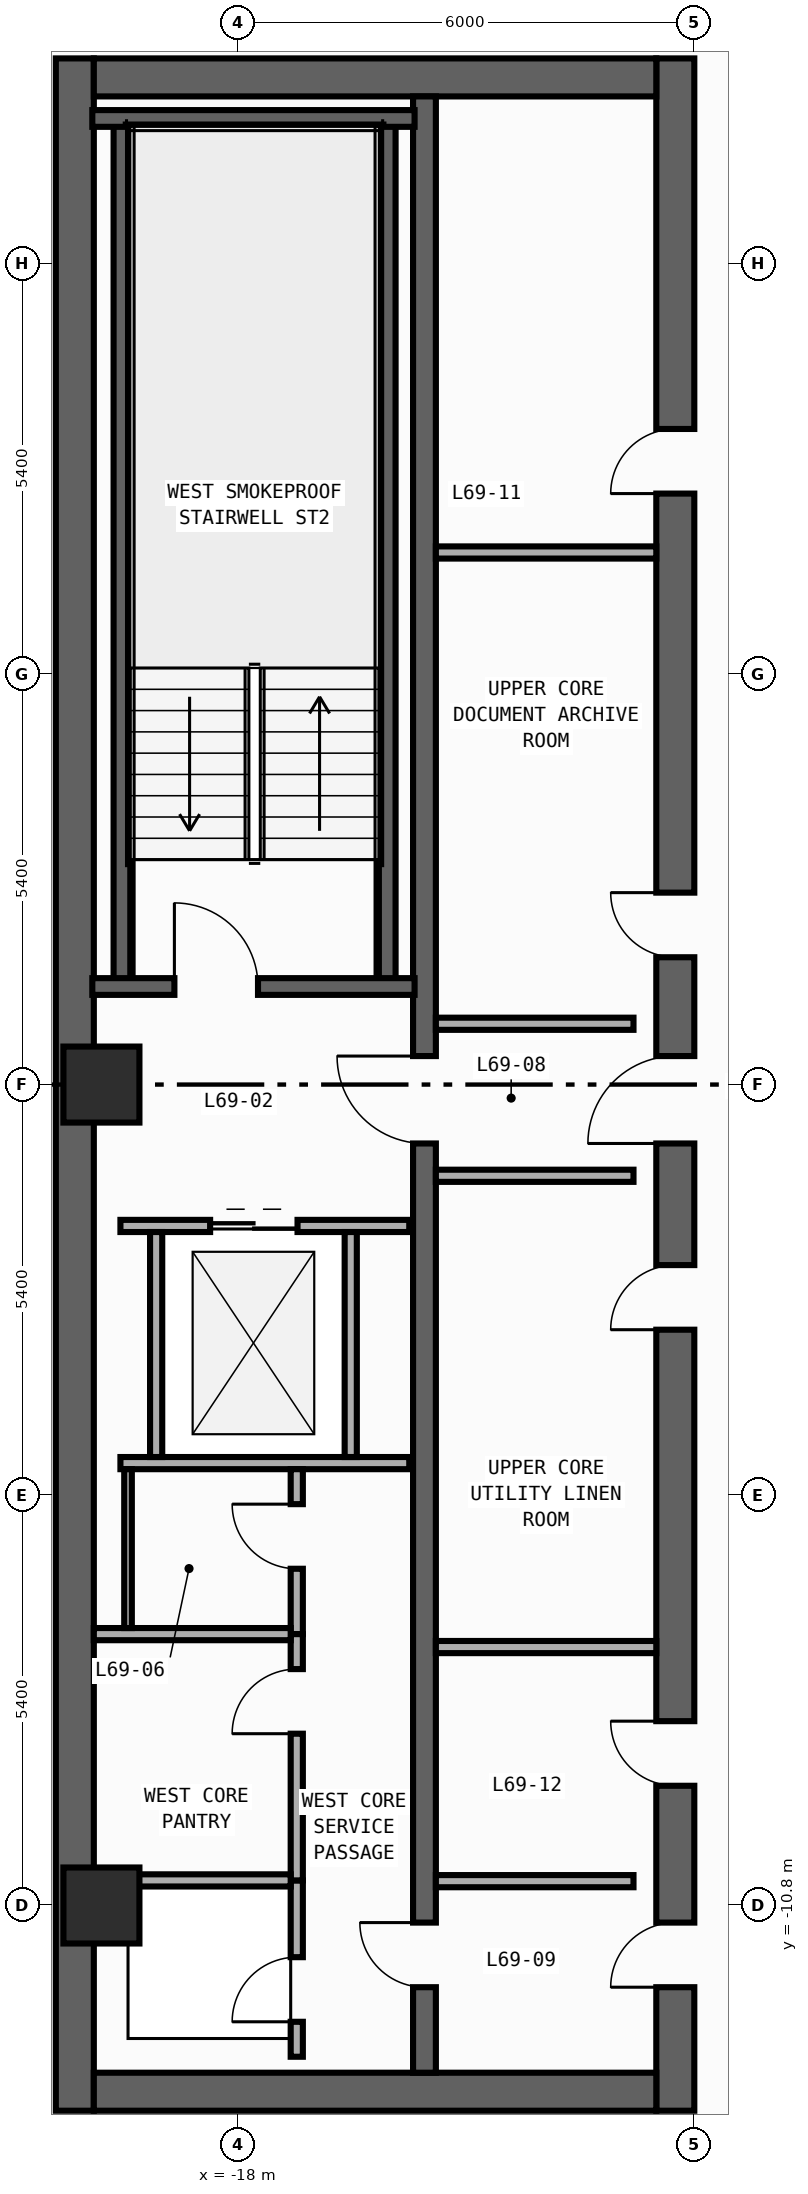
"""IFC4 building model, lengths in metres.
Left out: names, types, materials, properties, quantities, classifications, styles, units other than length and angle.
Written with IfcOpenShell. Run it as: python <this file> out.ifc"""

import sys

from ifc_helpers import new_model, si_unit, direction, frame, frame_2d, origin, origin_2d, place, context, subcontext, project, spatial, rectangle, circle, extrude, element, fill, save


model = new_model("IFC4")
c1 = context("Model", 3, precision=1e-05, world=origin(), true_north=direction((0.0, 1.0)))
c2 = subcontext(c1, "Body", "Model", "MODEL_VIEW")
j1 = project(units=[si_unit("LENGTHUNIT", "METRE"), si_unit("PLANEANGLEUNIT", "RADIAN")], contexts=[c1])
p1 = place(None, origin())
s1 = spatial("IfcSite", under=j1, at=p1, CompositionType="ELEMENT")
p2 = place(p1, origin())
s2 = spatial("IfcBuilding", under=s1, at=p2, CompositionType="ELEMENT")
p3 = place(p2, frame((0.0, 0.0, 289.0)))
s3 = spatial("IfcBuildingStorey", under=s2, at=p3, CompositionType="ELEMENT", Elevation=289.0)
p4 = place(p3, frame((-20.15, -13.5, 0.0), z_axis=(0.0, 0.0, 1.0), x_axis=(0.0, 1.0, 0.0)))
e1 = element("IfcWall", 1, at=p4, inside=s3, PredefinedType="SHEAR", context=c2, shape_type="SweptSolid", body=[
    extrude(rectangle(XDim=27.0, YDim=0.5, at=frame_2d((13.5, 0.0))), origin(), (0.0, 0.0, 1.0), 3.54),
])
p5 = place(p3, frame((-12.25, -13.5, 0.0), z_axis=(0.0, 0.0, 1.0), x_axis=(0.0, 1.0, 0.0)))
e2 = element("IfcWall", 2, at=p5, inside=s3, PredefinedType="SHEAR", context=c2, shape_type="SweptSolid", body=[
    extrude(rectangle(XDim=27.0, YDim=0.5, at=frame_2d((13.5, 0.0))), origin(), (0.0, 0.0, 1.0), 3.54),
])
p6 = place(p5, frame((15.175, 0.0, 0.0)))
e3 = element("IfcOpeningElement", 3, at=p6, cuts=e2, PredefinedType="OPENING", context=c2, shape_type="SweptSolid", body=[
    extrude(rectangle(XDim=0.85, YDim=2.1, at=frame_2d((0.425, 1.05))), frame((0.0, 0.26, 0.0), z_axis=(0.0, -1.0, 0.0), x_axis=(1.0, 0.0, 0.0)), (0.0, 0.0, 1.0), 0.52),
])
p7 = place(p5, frame((21.275, 0.0, 0.0)))
e4 = element("IfcOpeningElement", 4, at=p7, cuts=e2, PredefinedType="OPENING", context=c2, shape_type="SweptSolid", body=[
    extrude(rectangle(XDim=0.85, YDim=2.1, at=frame_2d((0.425, 1.05))), frame((0.0, 0.26, 0.0), z_axis=(0.0, -1.0, 0.0), x_axis=(1.0, 0.0, 0.0)), (0.0, 0.0, 1.0), 0.52),
])
p8 = place(p5, frame((4.275, 0.0, 0.0)))
e5 = element("IfcOpeningElement", 5, at=p8, cuts=e2, PredefinedType="OPENING", context=c2, shape_type="SweptSolid", body=[
    extrude(rectangle(XDim=0.85, YDim=2.1, at=frame_2d((0.425, 1.05))), frame((0.0, 0.26, 0.0), z_axis=(0.0, -1.0, 0.0), x_axis=(1.0, 0.0, 0.0)), (0.0, 0.0, 1.0), 0.52),
])
p9 = place(p5, frame((10.275, 0.0, 0.0)))
e6 = element("IfcOpeningElement", 6, at=p9, cuts=e2, PredefinedType="OPENING", context=c2, shape_type="SweptSolid", body=[
    extrude(rectangle(XDim=0.85, YDim=2.1, at=frame_2d((0.425, 1.05))), frame((0.0, 0.26, 0.0), z_axis=(0.0, -1.0, 0.0), x_axis=(1.0, 0.0, 0.0)), (0.0, 0.0, 1.0), 0.52),
])
p10 = place(p5, frame((12.725, 0.0, 0.0)))
e7 = element("IfcOpeningElement", 7, at=p10, cuts=e2, PredefinedType="OPENING", context=c2, shape_type="SweptSolid", body=[
    extrude(rectangle(XDim=1.15, YDim=2.2, at=frame_2d((0.575, 1.1))), frame((0.0, 0.26, 0.0), z_axis=(0.0, -1.0, 0.0), x_axis=(1.0, 0.0, 0.0)), (0.0, 0.0, 1.0), 0.52),
])
p11 = place(p5, frame((1.625, 0.0, 0.0)))
e8 = element("IfcOpeningElement", 8, at=p11, cuts=e2, PredefinedType="OPENING", context=c2, shape_type="SweptSolid", body=[
    extrude(rectangle(XDim=0.85, YDim=2.1, at=frame_2d((0.425, 1.05))), frame((0.0, 0.26, 0.0), z_axis=(0.0, -1.0, 0.0), x_axis=(1.0, 0.0, 0.0)), (0.0, 0.0, 1.0), 0.52),
])
for number, where, z_axis, x_axis in (
    (9, (-19.9, -13.25, 0.0), (0.0, 0.0, 1.0), (1.0, 0.0, 0.0)),
    (10, (-19.9, 13.25, 0.0), (0.0, 0.0, 1.0), (1.0, 0.0, 0.0)),
):
    element("IfcWall", number, at=place(p3, frame(where, z_axis=z_axis, x_axis=x_axis)), inside=s3, PredefinedType="SHEAR", context=c2, shape_type="SweptSolid", body=[
        extrude(rectangle(XDim=7.4, YDim=0.5, at=frame_2d((3.7, 0.0))), origin(), (0.0, 0.0, 1.0), 3.54),
    ])
p12 = place(p3, frame((-15.55, -13.0, 0.0), z_axis=(0.0, 0.0, 1.0), x_axis=(0.0, 1.0, 0.0)))
e11 = element("IfcWall", 11, at=p12, inside=s3, PredefinedType="SHEAR", context=c2, shape_type="SweptSolid", body=[
    extrude(rectangle(XDim=26.0, YDim=0.3, at=frame_2d((13.0, 0.0))), origin(), (0.0, 0.0, 1.0), 3.54),
])
p13 = place(p12, frame((12.225, 0.0, 0.0)))
e12 = element("IfcOpeningElement", 12, at=p13, cuts=e11, PredefinedType="OPENING", context=c2, shape_type="SweptSolid", body=[
    extrude(rectangle(XDim=1.15, YDim=2.2, at=frame_2d((0.575, 1.1))), frame((0.0, 0.16, 0.0), z_axis=(0.0, -1.0, 0.0), x_axis=(1.0, 0.0, 0.0)), (0.0, 0.0, 1.0), 0.32),
])
p14 = place(p12, frame((1.125, 0.0, 0.0)))
e13 = element("IfcOpeningElement", 13, at=p14, cuts=e11, PredefinedType="OPENING", context=c2, shape_type="SweptSolid", body=[
    extrude(rectangle(XDim=0.85, YDim=2.1, at=frame_2d((0.425, 1.05))), frame((0.0, 0.16, 0.0), z_axis=(0.0, -1.0, 0.0), x_axis=(1.0, 0.0, 0.0)), (0.0, 0.0, 1.0), 0.32),
])
for number, where, z_axis, x_axis in (
    (14, (-16.04, 1.29, 0.0), (0.0, 0.0, 1.0), (0.0, 1.0, 0.0)),
    (15, (-19.53, 1.29, 0.0), (0.0, 0.0, 1.0), (0.0, 1.0, 0.0)),
):
    element("IfcWall", number, at=place(p3, frame(where, z_axis=z_axis, x_axis=x_axis)), inside=s3, PredefinedType="SHEAR", context=c2, shape_type="SweptSolid", body=[
        extrude(rectangle(XDim=11.42, YDim=0.22, at=frame_2d((5.71, 0.0))), origin(), (0.0, 0.0, 1.0), 3.54),
    ])
p15 = place(p3, frame((-19.92, 12.71, 0.0), z_axis=(0.0, 0.0, 1.0), x_axis=(1.0, 0.0, 0.0)))
e16 = element("IfcWall", 16, at=p15, inside=s3, PredefinedType="SHEAR", context=c2, shape_type="SweptSolid", body=[
    extrude(rectangle(XDim=4.24, YDim=0.22, at=frame_2d((2.12, 0.0))), origin(), (0.0, 0.0, 1.0), 3.54),
])
p16 = place(p3, frame((-19.92, 1.29, 0.0), z_axis=(0.0, 0.0, 1.0), x_axis=(1.0, 0.0, 0.0)))
e17 = element("IfcWall", 17, at=p16, inside=s3, PredefinedType="SHEAR", context=c2, shape_type="SweptSolid", body=[
    extrude(rectangle(XDim=4.24, YDim=0.22, at=frame_2d((2.12, 0.0))), origin(), (0.0, 0.0, 1.0), 3.54),
])
p17 = place(p16, frame((1.08, 0.0, 0.0)))
e18 = element("IfcOpeningElement", 18, at=p17, cuts=e17, PredefinedType="OPENING", context=c2, shape_type="SweptSolid", body=[
    extrude(rectangle(XDim=1.1, YDim=2.2, at=frame_2d((0.55, 1.1))), frame((0.0, 0.12, 0.0), z_axis=(0.0, -1.0, 0.0), x_axis=(1.0, 0.0, 0.0)), (0.0, 0.0, 1.0), 0.24),
])
for number, where, z_axis, x_axis in (
    (19, (-19.8, -10.8, 0.0), (0.0, 0.0, 1.0), (1.0, 0.0, 0.0)),
    (20, (-19.8, 0.0, 0.0), (0.0, 0.0, 1.0), (1.0, 0.0, 0.0)),
):
    element("IfcColumn", number, at=place(p3, frame(where, z_axis=z_axis, x_axis=x_axis)), inside=s3, PredefinedType="COLUMN", context=c2, shape_type="SweptSolid", body=[
        extrude(circle(Radius=0.5, at=origin_2d()), origin(), (0.0, 0.0, 1.0), 3.8),
    ])
p18 = place(p3, frame((-19.55, -1.86, 0.0), z_axis=(0.0, 0.0, 1.0), x_axis=(1.0, 0.0, 0.0)))
e21 = element("IfcWall", 21, at=p18, inside=s3, PredefinedType="STANDARD", context=c2, shape_type="SweptSolid", body=[
    extrude(rectangle(XDim=3.8, YDim=0.16, at=frame_2d((1.9, 0.0))), origin(), (0.0, 0.0, 1.0), 3.54),
])
p19 = place(p18, frame((1.18, 0.0, 0.0)))
e22 = element("IfcOpeningElement", 22, at=p19, cuts=e21, PredefinedType="OPENING", context=c2, shape_type="SweptSolid", body=[
    extrude(rectangle(XDim=1.15, YDim=2.2, at=frame_2d((0.575, 1.1))), frame((0.0, 0.09, 0.0), z_axis=(0.0, -1.0, 0.0), x_axis=(1.0, 0.0, 0.0)), (0.0, 0.0, 1.0), 0.18),
])
p20 = place(p3, frame((-19.55, -4.98, 0.0), z_axis=(0.0, 0.0, 1.0), x_axis=(1.0, 0.0, 0.0)))
e23 = element("IfcWall", 23, at=p20, inside=s3, PredefinedType="STANDARD", context=c2, shape_type="SweptSolid", body=[
    extrude(rectangle(XDim=3.8, YDim=0.16, at=frame_2d((1.9, 0.0))), origin(), (0.0, 0.0, 1.0), 3.54),
])
for number, where, z_axis, x_axis in (
    (24, (-19.08, -4.9, 0.0), (0.0, 0.0, 1.0), (0.0, 1.0, 0.0)),
    (25, (-16.52, -4.9, 0.0), (0.0, 0.0, 1.0), (0.0, 1.0, 0.0)),
):
    element("IfcWall", number, at=place(p3, frame(where, z_axis=z_axis, x_axis=x_axis)), inside=s3, PredefinedType="STANDARD", context=c2, shape_type="SweptSolid", body=[
        extrude(rectangle(XDim=2.96, YDim=0.16, at=frame_2d((1.48, 0.0))), origin(), (0.0, 0.0, 1.0), 3.54),
    ])
for number, where, z_axis, x_axis in (
    (26, (-15.4, 0.8, 0.0), (0.0, 0.0, 1.0), (1.0, 0.0, 0.0)),
    (27, (-15.4, -1.2, 0.0), (0.0, 0.0, 1.0), (1.0, 0.0, 0.0)),
    (28, (-15.4, -10.48, 0.0), (0.0, 0.0, 1.0), (1.0, 0.0, 0.0)),
):
    element("IfcWall", number, at=place(p3, frame(where, z_axis=z_axis, x_axis=x_axis)), inside=s3, PredefinedType="STANDARD", context=c2, shape_type="SweptSolid", body=[
        extrude(rectangle(XDim=2.6, YDim=0.16, at=frame_2d((1.3, 0.0))), origin(), (0.0, 0.0, 1.0), 3.54),
    ])
p21 = place(p3, frame((-17.23, -12.79, 0.0), z_axis=(0.0, 0.0, 1.0), x_axis=(0.0, 1.0, 0.0)))
e29 = element("IfcWall", 29, at=p21, inside=s3, PredefinedType="PARTITIONING", context=c2, shape_type="SweptSolid", body=[
    extrude(rectangle(XDim=2.32, YDim=0.16, at=frame_2d((1.16, 0.0))), origin(), (0.0, 0.0, 1.0), 3.54),
])
p22 = place(p21, frame((0.46, 0.0, 0.0)))
e30 = element("IfcOpeningElement", 30, at=p22, cuts=e29, PredefinedType="OPENING", context=c2, shape_type="SweptSolid", body=[
    extrude(rectangle(XDim=0.85, YDim=2.1, at=frame_2d((0.425, 1.05))), frame((0.0, 0.09, 0.0), z_axis=(0.0, -1.0, 0.0), x_axis=(1.0, 0.0, 0.0)), (0.0, 0.0, 1.0), 0.18),
])
p23 = place(p3, frame((-17.23, -7.23, 0.0), z_axis=(0.0, 0.0, 1.0), x_axis=(0.0, 1.0, 0.0)))
e31 = element("IfcWall", 31, at=p23, inside=s3, PredefinedType="PARTITIONING", context=c2, shape_type="SweptSolid", body=[
    extrude(rectangle(XDim=2.17, YDim=0.16, at=frame_2d((1.085, 0.0))), origin(), (0.0, 0.0, 1.0), 3.54),
])
p24 = place(p23, frame((0.86, 0.0, 0.0)))
e32 = element("IfcOpeningElement", 32, at=p24, cuts=e31, PredefinedType="OPENING", context=c2, shape_type="SweptSolid", body=[
    extrude(rectangle(XDim=0.85, YDim=2.1, at=frame_2d((0.425, 1.05))), frame((0.0, 0.09, 0.0), z_axis=(0.0, -1.0, 0.0), x_axis=(1.0, 0.0, 0.0)), (0.0, 0.0, 1.0), 0.18),
])
p25 = place(p3, frame((-17.23, -10.47, 0.0), z_axis=(0.0, 0.0, 1.0), x_axis=(0.0, 1.0, 0.0)))
e33 = element("IfcWall", 33, at=p25, inside=s3, PredefinedType="PARTITIONING", context=c2, shape_type="SweptSolid", body=[
    extrude(rectangle(XDim=3.24, YDim=0.16, at=frame_2d((1.62, 0.0))), origin(), (0.0, 0.0, 1.0), 3.54),
])
p26 = place(p25, frame((1.93, 0.0, 0.0)))
e34 = element("IfcOpeningElement", 34, at=p26, cuts=e33, PredefinedType="OPENING", context=c2, shape_type="SweptSolid", body=[
    extrude(rectangle(XDim=0.85, YDim=2.1, at=frame_2d((0.425, 1.05))), frame((0.0, 0.09, 0.0), z_axis=(0.0, -1.0, 0.0), x_axis=(1.0, 0.0, 0.0)), (0.0, 0.0, 1.0), 0.18),
])
p27 = place(p3, frame((-19.75, -10.47, 0.0), z_axis=(0.0, 0.0, 1.0), x_axis=(1.0, 0.0, 0.0)))
e35 = element("IfcWall", 35, at=p27, inside=s3, PredefinedType="PARTITIONING", context=c2, shape_type="SweptSolid", body=[
    extrude(rectangle(XDim=2.44, YDim=0.16, at=frame_2d((1.22, 0.0))), origin(), (0.0, 0.0, 1.0), 3.54),
])
p28 = place(p3, frame((-19.9, -7.23, 0.0), z_axis=(0.0, 0.0, 1.0), x_axis=(1.0, 0.0, 0.0)))
e36 = element("IfcWall", 36, at=p28, inside=s3, PredefinedType="PARTITIONING", context=c2, shape_type="SweptSolid", body=[
    extrude(rectangle(XDim=2.59, YDim=0.16, at=frame_2d((1.295, 0.0))), origin(), (0.0, 0.0, 1.0), 3.54),
])
for number, where, z_axis, x_axis in (
    (37, (-15.4, 7.0, 0.0), (0.0, 0.0, 1.0), (1.0, 0.0, 0.0)),
    (38, (-15.4, -7.4, 0.0), (0.0, 0.0, 1.0), (1.0, 0.0, 0.0)),
):
    element("IfcWall", number, at=place(p3, frame(where, z_axis=z_axis, x_axis=x_axis)), inside=s3, PredefinedType="PARTITIONING", context=c2, shape_type="SweptSolid", body=[
        extrude(rectangle(XDim=2.9, YDim=0.16, at=frame_2d((1.45, 0.0))), origin(), (0.0, 0.0, 1.0), 3.54),
    ])
p29 = place(p3, frame((-19.45, -7.15, 0.0), z_axis=(0.0, 0.0, 1.0), x_axis=(0.0, 1.0, 0.0)))
e39 = element("IfcWall", 39, at=p29, inside=s3, PredefinedType="PARTITIONING", context=c2, shape_type="SweptSolid", body=[
    extrude(rectangle(XDim=2.09, YDim=0.1, at=frame_2d((1.045, 0.0))), origin(), (0.0, 0.0, 1.0), 3.54),
])
p30 = place(p17, origin())
e40 = element("IfcDoor", 40, at=p30, inside=s3, OperationType="SINGLE_SWING_LEFT", PredefinedType="DOOR", context=c2, shape_type="SweptSolid", body=[
    extrude(rectangle(XDim=1.1, YDim=2.2, at=frame_2d((0.55, 1.1))), frame((0.0, 0.025, 0.0), z_axis=(0.0, -1.0, 0.0), x_axis=(1.0, 0.0, 0.0)), (0.0, 0.0, 1.0), 0.05),
])
fill(e18, e40)
p31 = place(p6, origin())
e41 = element("IfcDoor", 41, at=p31, inside=s3, OperationType="SINGLE_SWING_RIGHT", PredefinedType="DOOR", context=c2, shape_type="SweptSolid", body=[
    extrude(rectangle(XDim=0.85, YDim=2.1, at=frame_2d((0.425, 1.05))), frame((0.0, 0.025, 0.0), z_axis=(0.0, -1.0, 0.0), x_axis=(1.0, 0.0, 0.0)), (0.0, 0.0, 1.0), 0.05),
])
fill(e3, e41)
p32 = place(p7, origin())
e42 = element("IfcDoor", 42, at=p32, inside=s3, OperationType="SINGLE_SWING_LEFT", PredefinedType="DOOR", context=c2, shape_type="SweptSolid", body=[
    extrude(rectangle(XDim=0.85, YDim=2.1, at=frame_2d((0.425, 1.05))), frame((0.0, 0.025, 0.0), z_axis=(0.0, -1.0, 0.0), x_axis=(1.0, 0.0, 0.0)), (0.0, 0.0, 1.0), 0.05),
])
fill(e4, e42)
p33 = place(p8, origin())
e43 = element("IfcDoor", 43, at=p33, inside=s3, OperationType="SINGLE_SWING_RIGHT", PredefinedType="DOOR", context=c2, shape_type="SweptSolid", body=[
    extrude(rectangle(XDim=0.85, YDim=2.1, at=frame_2d((0.425, 1.05))), frame((0.0, 0.025, 0.0), z_axis=(0.0, -1.0, 0.0), x_axis=(1.0, 0.0, 0.0)), (0.0, 0.0, 1.0), 0.05),
])
fill(e5, e43)
p34 = place(p9, origin())
e44 = element("IfcDoor", 44, at=p34, inside=s3, OperationType="SINGLE_SWING_LEFT", PredefinedType="DOOR", context=c2, shape_type="SweptSolid", body=[
    extrude(rectangle(XDim=0.85, YDim=2.1, at=frame_2d((0.425, 1.05))), frame((0.0, 0.025, 0.0), z_axis=(0.0, -1.0, 0.0), x_axis=(1.0, 0.0, 0.0)), (0.0, 0.0, 1.0), 0.05),
])
fill(e6, e44)
p35 = place(p10, origin())
e45 = element("IfcDoor", 45, at=p35, inside=s3, OperationType="SINGLE_SWING_LEFT", PredefinedType="DOOR", context=c2, shape_type="SweptSolid", body=[
    extrude(rectangle(XDim=1.15, YDim=2.2, at=frame_2d((0.575, 1.1))), frame((0.0, 0.025, 0.0), z_axis=(0.0, -1.0, 0.0), x_axis=(1.0, 0.0, 0.0)), (0.0, 0.0, 1.0), 0.05),
])
fill(e7, e45)
p36 = place(p13, origin())
e46 = element("IfcDoor", 46, at=p36, inside=s3, OperationType="SINGLE_SWING_RIGHT", PredefinedType="DOOR", context=c2, shape_type="SweptSolid", body=[
    extrude(rectangle(XDim=1.15, YDim=2.2, at=frame_2d((0.575, 1.1))), frame((0.0, 0.025, 0.0), z_axis=(0.0, -1.0, 0.0), x_axis=(1.0, 0.0, 0.0)), (0.0, 0.0, 1.0), 0.05),
])
fill(e12, e46)
p37 = place(p11, origin())
e47 = element("IfcDoor", 47, at=p37, inside=s3, OperationType="SINGLE_SWING_LEFT", PredefinedType="DOOR", context=c2, shape_type="SweptSolid", body=[
    extrude(rectangle(XDim=0.85, YDim=2.1, at=frame_2d((0.425, 1.05))), frame((0.0, 0.025, 0.0), z_axis=(0.0, -1.0, 0.0), x_axis=(1.0, 0.0, 0.0)), (0.0, 0.0, 1.0), 0.05),
])
fill(e8, e47)
p38 = place(p14, origin())
e48 = element("IfcDoor", 48, at=p38, inside=s3, OperationType="SINGLE_SWING_RIGHT", PredefinedType="DOOR", context=c2, shape_type="SweptSolid", body=[
    extrude(rectangle(XDim=0.85, YDim=2.1, at=frame_2d((0.425, 1.05))), frame((0.0, 0.025, 0.0), z_axis=(0.0, -1.0, 0.0), x_axis=(1.0, 0.0, 0.0)), (0.0, 0.0, 1.0), 0.05),
])
fill(e13, e48)
p39 = place(p19, origin())
e49 = element("IfcDoor", 49, at=p39, inside=s3, OperationType="DOUBLE_DOOR_SLIDING", PredefinedType="DOOR", context=c2, shape_type="SweptSolid", body=[
    extrude(rectangle(XDim=1.15, YDim=2.2, at=frame_2d((0.575, 1.1))), frame((0.0, 0.025, 0.0), z_axis=(0.0, -1.0, 0.0), x_axis=(1.0, 0.0, 0.0)), (0.0, 0.0, 1.0), 0.05),
])
fill(e22, e49)
p40 = place(p22, origin())
e50 = element("IfcDoor", 50, at=p40, inside=s3, OperationType="SINGLE_SWING_LEFT", PredefinedType="DOOR", context=c2, shape_type="SweptSolid", body=[
    extrude(rectangle(XDim=0.85, YDim=2.1, at=frame_2d((0.425, 1.05))), frame((0.0, 0.025, 0.0), z_axis=(0.0, -1.0, 0.0), x_axis=(1.0, 0.0, 0.0)), (0.0, 0.0, 1.0), 0.05),
])
fill(e30, e50)
p41 = place(p24, origin())
e51 = element("IfcDoor", 51, at=p41, inside=s3, OperationType="SINGLE_SWING_RIGHT", PredefinedType="DOOR", context=c2, shape_type="SweptSolid", body=[
    extrude(rectangle(XDim=0.85, YDim=2.1, at=frame_2d((0.425, 1.05))), frame((0.0, 0.025, 0.0), z_axis=(0.0, -1.0, 0.0), x_axis=(1.0, 0.0, 0.0)), (0.0, 0.0, 1.0), 0.05),
])
fill(e32, e51)
p42 = place(p26, origin())
e52 = element("IfcDoor", 52, at=p42, inside=s3, OperationType="SINGLE_SWING_LEFT", PredefinedType="DOOR", context=c2, shape_type="SweptSolid", body=[
    extrude(rectangle(XDim=0.85, YDim=2.1, at=frame_2d((0.425, 1.05))), frame((0.0, 0.025, 0.0), z_axis=(0.0, -1.0, 0.0), x_axis=(1.0, 0.0, 0.0)), (0.0, 0.0, 1.0), 0.05),
])
fill(e34, e52)
save(model, sys.argv[1])
